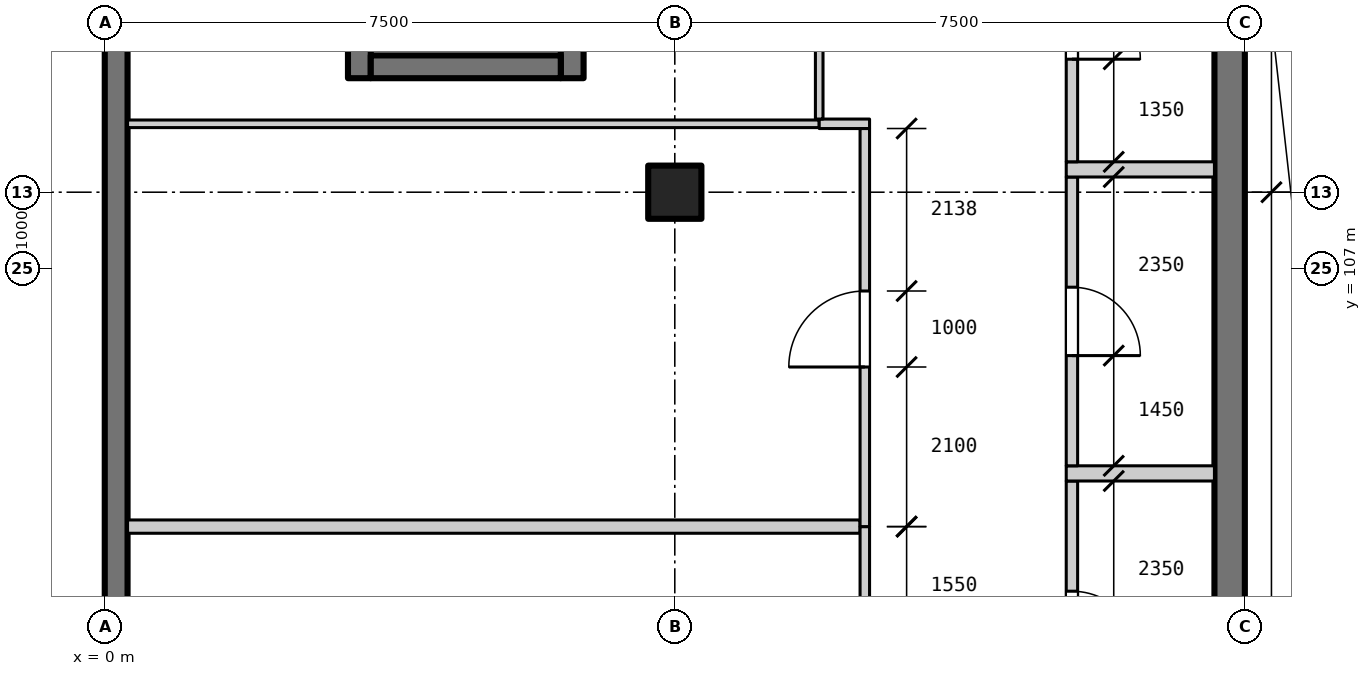
"""IFC4 building model, lengths in metres.
Left out: names, types, materials, properties, quantities, classifications, styles, units other than length and angle.
Written with IfcOpenShell. Run it as: python <this file> out.ifc"""

import sys

from ifc_helpers import new_model, si_unit, direction, frame, frame_2d, origin, origin_2d, place, context, subcontext, project, spatial, rectangle, extrude, element, fill, save


model = new_model("IFC4")
c1 = context("Model", 3, precision=1e-05, world=origin(), true_north=direction((0.0, 1.0)))
c2 = subcontext(c1, "Body", "Model", "MODEL_VIEW")
j1 = project(units=[si_unit("LENGTHUNIT", "METRE"), si_unit("PLANEANGLEUNIT", "RADIAN")], contexts=[c1])
p1 = place(None, origin())
s1 = spatial("IfcSite", under=j1, at=p1, CompositionType="ELEMENT")
p2 = place(p1, origin())
s2 = spatial("IfcBuilding", under=s1, at=p2, CompositionType="ELEMENT")
p3 = place(p2, frame((0.0, 0.0, 6.0)))
s3 = spatial("IfcBuildingStorey", under=s2, at=p3, CompositionType="ELEMENT", Elevation=6.0)
p4 = place(p3, frame((7.5, 108.0, 0.0), z_axis=(0.0, 0.0, 1.0), x_axis=(1.0, 0.0, 0.0)))
e1 = element("IfcColumn", 1, at=p4, inside=s3, PredefinedType="COLUMN", context=c2, shape_type="SweptSolid", body=[
    extrude(rectangle(XDim=0.7, YDim=0.7, at=origin_2d()), origin(), (0.0, 0.0, 1.0), 3.9),
])
p5 = place(p3, frame((0.15, 18.0, 0.0), z_axis=(0.0, 0.0, 1.0), x_axis=(0.0, 1.0, 0.0)))
e2 = element("IfcWall", 2, at=p5, inside=s3, PredefinedType="SHEAR", context=c2, shape_type="SweptSolid", body=[
    extrude(rectangle(XDim=108.0, YDim=0.3, at=frame_2d((54.0, 0.0))), origin(), (0.0, 0.0, 1.0), 4.2),
])
p6 = place(p3, frame((14.8, 99.0, 0.0), z_axis=(0.0, 0.0, 1.0), x_axis=(0.0, 1.0, 0.0)))
e3 = element("IfcWall", 3, at=p6, inside=s3, PredefinedType="SHEAR", context=c2, shape_type="SweptSolid", body=[
    extrude(rectangle(XDim=26.55, YDim=0.4, at=frame_2d((13.275, 0.0))), origin(), (0.0, 0.0, 1.0), 4.2),
])
p7 = place(p6, frame((13.55, 0.0, 0.0)))
e4 = element("IfcOpeningElement", 4, at=p7, cuts=e3, PredefinedType="OPENING", context=c2, shape_type="SweptSolid", body=[
    extrude(rectangle(XDim=1.4, YDim=2.4, at=frame_2d((0.7, 1.2))), frame((0.0, 0.21, 0.0), z_axis=(0.0, -1.0, 0.0), x_axis=(1.0, 0.0, 0.0)), (0.0, 0.0, 1.0), 0.42),
])
for number, where, z_axis, x_axis in (
    (5, (3.35, 109.5, 0.0), (0.0, 0.0, 1.0), (0.0, 1.0, 0.0)),
    (6, (6.15, 109.5, 0.0), (0.0, 0.0, 1.0), (0.0, 1.0, 0.0)),
):
    element("IfcWall", number, at=place(p3, frame(where, z_axis=z_axis, x_axis=x_axis)), inside=s3, PredefinedType="SHEAR", context=c2, shape_type="SweptSolid", body=[
        extrude(rectangle(XDim=2.8, YDim=0.3, at=frame_2d((1.4, 0.0))), origin(), (0.0, 0.0, 1.0), 4.2),
    ])
p8 = place(p3, frame((3.5, 109.65, 0.0), z_axis=(0.0, 0.0, 1.0), x_axis=(1.0, 0.0, 0.0)))
e7 = element("IfcWall", 7, at=p8, inside=s3, PredefinedType="SHEAR", context=c2, shape_type="SweptSolid", body=[
    extrude(rectangle(XDim=2.5, YDim=0.3, at=frame_2d((1.25, 0.0))), origin(), (0.0, 0.0, 1.0), 4.2),
])
p9 = place(p3, frame((12.725, 100.4, 0.0), z_axis=(0.0, 0.0, 1.0), x_axis=(0.0, 1.0, 0.0)))
e8 = element("IfcWall", 8, at=p9, inside=s3, PredefinedType="PARTITIONING", context=c2, shape_type="SweptSolid", body=[
    extrude(rectangle(XDim=3.8, YDim=0.15, at=frame_2d((1.9, 0.0))), origin(), (0.0, 0.0, 1.0), 3.9),
])
p10 = place(p9, frame((1.45, 0.0, 0.0)))
e9 = element("IfcOpeningElement", 9, at=p10, cuts=e8, PredefinedType="OPENING", context=c2, shape_type="SweptSolid", body=[
    extrude(rectangle(XDim=0.9, YDim=2.1, at=frame_2d((0.45, 1.05))), frame((0.0, 0.085, 0.0), z_axis=(0.0, -1.0, 0.0), x_axis=(1.0, 0.0, 0.0)), (0.0, 0.0, 1.0), 0.17),
])
p11 = place(p3, frame((12.65, 104.3, 0.0), z_axis=(0.0, 0.0, 1.0), x_axis=(1.0, 0.0, 0.0)))
e10 = element("IfcWall", 10, at=p11, inside=s3, PredefinedType="PARTITIONING", context=c2, shape_type="SweptSolid", body=[
    extrude(rectangle(XDim=1.95, YDim=0.2, at=frame_2d((0.975, 0.0))), origin(), (0.0, 0.0, 1.0), 3.9),
])
p12 = place(p3, frame((12.725, 104.4, 0.0), z_axis=(0.0, 0.0, 1.0), x_axis=(0.0, 1.0, 0.0)))
e11 = element("IfcWall", 11, at=p12, inside=s3, PredefinedType="PARTITIONING", context=c2, shape_type="SweptSolid", body=[
    extrude(rectangle(XDim=3.8, YDim=0.15, at=frame_2d((1.9, 0.0))), origin(), (0.0, 0.0, 1.0), 3.9),
])
p13 = place(p12, frame((1.45, 0.0, 0.0)))
e12 = element("IfcOpeningElement", 12, at=p13, cuts=e11, PredefinedType="OPENING", context=c2, shape_type="SweptSolid", body=[
    extrude(rectangle(XDim=0.9, YDim=2.1, at=frame_2d((0.45, 1.05))), frame((0.0, 0.085, 0.0), z_axis=(0.0, -1.0, 0.0), x_axis=(1.0, 0.0, 0.0)), (0.0, 0.0, 1.0), 0.17),
])
p14 = place(p3, frame((12.65, 108.3, 0.0), z_axis=(0.0, 0.0, 1.0), x_axis=(1.0, 0.0, 0.0)))
e13 = element("IfcWall", 13, at=p14, inside=s3, PredefinedType="PARTITIONING", context=c2, shape_type="SweptSolid", body=[
    extrude(rectangle(XDim=1.95, YDim=0.2, at=frame_2d((0.975, 0.0))), origin(), (0.0, 0.0, 1.0), 3.9),
])
p15 = place(p3, frame((12.725, 108.4, 0.0), z_axis=(0.0, 0.0, 1.0), x_axis=(0.0, 1.0, 0.0)))
e14 = element("IfcWall", 14, at=p15, inside=s3, PredefinedType="PARTITIONING", context=c2, shape_type="SweptSolid", body=[
    extrude(rectangle(XDim=3.6, YDim=0.15, at=frame_2d((1.8, 0.0))), origin(), (0.0, 0.0, 1.0), 3.9),
])
p16 = place(p15, frame((1.35, 0.0, 0.0)))
e15 = element("IfcOpeningElement", 15, at=p16, cuts=e14, PredefinedType="OPENING", context=c2, shape_type="SweptSolid", body=[
    extrude(rectangle(XDim=0.9, YDim=2.1, at=frame_2d((0.45, 1.05))), frame((0.0, 0.085, 0.0), z_axis=(0.0, -1.0, 0.0), x_axis=(1.0, 0.0, 0.0)), (0.0, 0.0, 1.0), 0.17),
])
p17 = place(p3, frame((0.3, 103.6, 0.0), z_axis=(0.0, 0.0, 1.0), x_axis=(1.0, 0.0, 0.0)))
e16 = element("IfcWall", 16, at=p17, inside=s3, PredefinedType="PARTITIONING", context=c2, shape_type="SweptSolid", body=[
    extrude(rectangle(XDim=9.637, YDim=0.175, at=frame_2d((4.819, 0.0))), origin(), (0.0, 0.0, 1.0), 3.9),
])
p18 = place(p3, frame((0.3, 108.9, 0.0), z_axis=(0.0, 0.0, 1.0), x_axis=(1.0, 0.0, 0.0)))
e17 = element("IfcWall", 17, at=p18, inside=s3, PredefinedType="PARTITIONING", context=c2, shape_type="SweptSolid", body=[
    extrude(rectangle(XDim=9.1, YDim=0.1, at=frame_2d((4.55, 0.0))), origin(), (0.0, 0.0, 1.0), 3.9),
])
p19 = place(p3, frame((9.4, 108.9, 0.0), z_axis=(0.0, 0.0, 1.0), x_axis=(1.0, 0.0, 0.0)))
e18 = element("IfcWall", 18, at=p19, inside=s3, PredefinedType="PARTITIONING", context=c2, shape_type="SweptSolid", body=[
    extrude(rectangle(XDim=0.663, YDim=0.125, at=frame_2d((0.331, 0.0))), origin(), (0.0, 0.0, 1.0), 3.9),
])
p20 = place(p3, frame((9.4, 108.962, 0.0), z_axis=(0.0, 0.0, 1.0), x_axis=(0.0, 1.0, 0.0)))
e19 = element("IfcWall", 19, at=p20, inside=s3, PredefinedType="PARTITIONING", context=c2, shape_type="SweptSolid", body=[
    extrude(rectangle(XDim=3.328, YDim=0.1, at=frame_2d((1.664, 0.0))), origin(), (0.0, 0.0, 1.0), 3.9),
])
p21 = place(p3, frame((10.0, 99.5, 0.0), z_axis=(0.0, 0.0, 1.0), x_axis=(0.0, 1.0, 0.0)))
e20 = element("IfcWall", 20, at=p21, inside=s3, PredefinedType="PARTITIONING", context=c2, shape_type="SweptSolid", body=[
    extrude(rectangle(XDim=4.1, YDim=0.125, at=frame_2d((2.05, 0.0))), origin(), (0.0, 0.0, 1.0), 3.9),
])
p22 = place(p21, frame((1.55, 0.0, 0.0)))
e21 = element("IfcOpeningElement", 21, at=p22, cuts=e20, PredefinedType="OPENING", context=c2, shape_type="SweptSolid", body=[
    extrude(rectangle(XDim=1.0, YDim=2.1, at=frame_2d((0.5, 1.05))), frame((0.0, 0.073, 0.0), z_axis=(0.0, -1.0, 0.0), x_axis=(1.0, 0.0, 0.0)), (0.0, 0.0, 1.0), 0.145),
])
p23 = place(p3, frame((10.0, 103.6, 0.0), z_axis=(0.0, 0.0, 1.0), x_axis=(0.0, 1.0, 0.0)))
e22 = element("IfcWall", 22, at=p23, inside=s3, PredefinedType="PARTITIONING", context=c2, shape_type="SweptSolid", body=[
    extrude(rectangle(XDim=5.237, YDim=0.125, at=frame_2d((2.619, 0.0))), origin(), (0.0, 0.0, 1.0), 3.9),
])
p24 = place(p23, frame((2.1, 0.0, 0.0)))
e23 = element("IfcOpeningElement", 23, at=p24, cuts=e22, PredefinedType="OPENING", context=c2, shape_type="SweptSolid", body=[
    extrude(rectangle(XDim=1.0, YDim=2.1, at=frame_2d((0.5, 1.05))), frame((0.0, 0.073, 0.0), z_axis=(0.0, -1.0, 0.0), x_axis=(1.0, 0.0, 0.0)), (0.0, 0.0, 1.0), 0.145),
])
p25 = place(p10, frame((0.9, 0.0, 0.0), z_axis=(0.0, 0.0, 1.0), x_axis=(-1.0, 0.0, 0.0)))
e24 = element("IfcDoor", 24, at=p25, inside=s3, OperationType="SINGLE_SWING_RIGHT", PredefinedType="DOOR", context=c2, shape_type="SweptSolid", body=[
    extrude(rectangle(XDim=0.9, YDim=2.1, at=frame_2d((0.45, 1.05))), frame((0.0, 0.025, 0.0), z_axis=(0.0, -1.0, 0.0), x_axis=(1.0, 0.0, 0.0)), (0.0, 0.0, 1.0), 0.05),
])
fill(e9, e24)
p26 = place(p24, origin())
e25 = element("IfcDoor", 25, at=p26, inside=s3, OperationType="SINGLE_SWING_LEFT", PredefinedType="DOOR", context=c2, shape_type="SweptSolid", body=[
    extrude(rectangle(XDim=1.0, YDim=2.1, at=frame_2d((0.5, 1.05))), frame((0.0, 0.025, 0.0), z_axis=(0.0, -1.0, 0.0), x_axis=(1.0, 0.0, 0.0)), (0.0, 0.0, 1.0), 0.05),
])
fill(e23, e25)
p27 = place(p13, frame((0.9, 0.0, 0.0), z_axis=(0.0, 0.0, 1.0), x_axis=(-1.0, 0.0, 0.0)))
e26 = element("IfcDoor", 26, at=p27, inside=s3, OperationType="SINGLE_SWING_RIGHT", PredefinedType="DOOR", context=c2, shape_type="SweptSolid", body=[
    extrude(rectangle(XDim=0.9, YDim=2.1, at=frame_2d((0.45, 1.05))), frame((0.0, 0.025, 0.0), z_axis=(0.0, -1.0, 0.0), x_axis=(1.0, 0.0, 0.0)), (0.0, 0.0, 1.0), 0.05),
])
fill(e12, e26)
p28 = place(p16, frame((0.9, 0.0, 0.0), z_axis=(0.0, 0.0, 1.0), x_axis=(-1.0, 0.0, 0.0)))
e27 = element("IfcDoor", 27, at=p28, inside=s3, OperationType="SINGLE_SWING_RIGHT", PredefinedType="DOOR", context=c2, shape_type="SweptSolid", body=[
    extrude(rectangle(XDim=0.9, YDim=2.1, at=frame_2d((0.45, 1.05))), frame((0.0, 0.025, 0.0), z_axis=(0.0, -1.0, 0.0), x_axis=(1.0, 0.0, 0.0)), (0.0, 0.0, 1.0), 0.05),
])
fill(e15, e27)
save(model, sys.argv[1])
